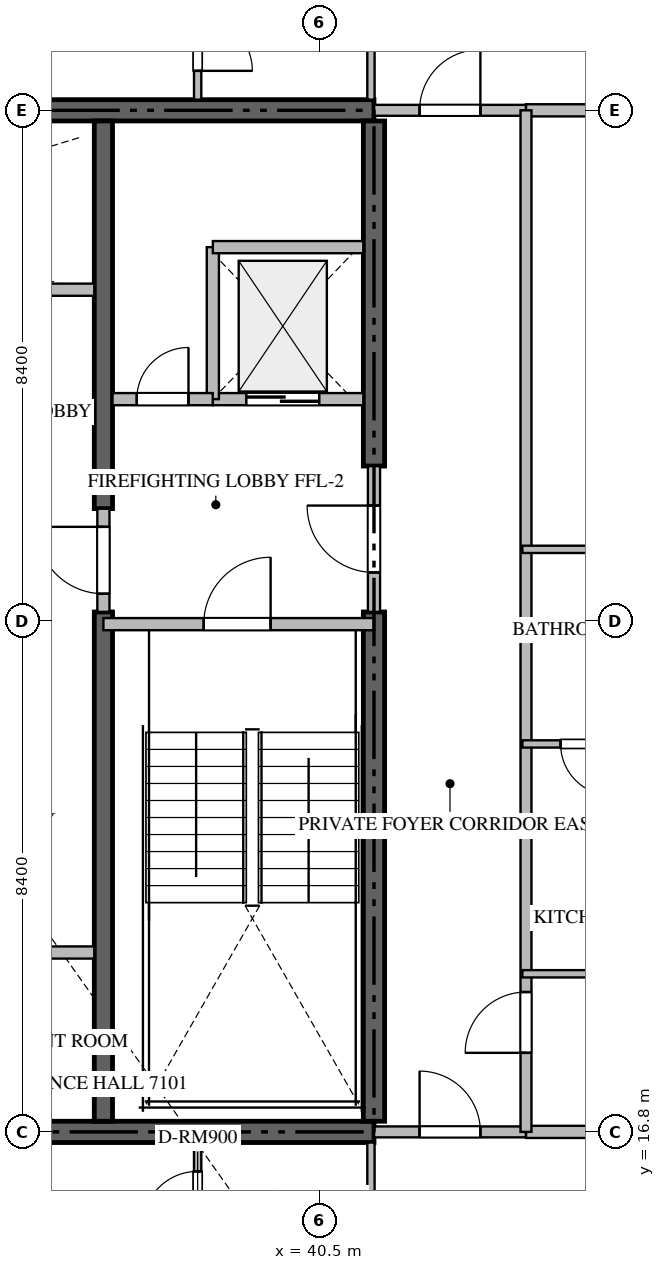
"""IFC4 building model, lengths in metres.
Left out: names, types, materials, properties, quantities, classifications, styles, units other than length and angle.
Written with IfcOpenShell. Run it as: python <this file> out.ifc"""

import sys

from ifc_helpers import new_model, si_unit, direction, frame, frame_2d, origin, place, context, subcontext, project, spatial, rectangle, extrude, source, transform, mapped, element, fill, save


model = new_model("IFC4")
c1 = context("Model", 3, precision=1e-05, world=origin(), true_north=direction((0.0, 1.0)))
c2 = subcontext(c1, "Body", "Model", "MODEL_VIEW")
j1 = project(units=[si_unit("LENGTHUNIT", "METRE"), si_unit("PLANEANGLEUNIT", "RADIAN")], contexts=[c1])
p1 = place(None, origin())
s1 = spatial("IfcSite", under=j1, at=p1, CompositionType="ELEMENT")
p2 = place(p1, origin())
s2 = spatial("IfcBuilding", under=s1, at=p2, CompositionType="ELEMENT")
p3 = place(p2, frame((0.0, 0.0, 283.6)))
s3 = spatial("IfcBuildingStorey", under=s2, at=p3, CompositionType="ELEMENT", Elevation=283.6)
for number, where, z_axis, x_axis in (
    (1, (23.4, 16.8, -0.26), (0.0, 0.0, 1.0), (1.0, 0.0, 0.0)),
    (2, (41.4, 33.6, -0.26), (0.0, 0.0, 1.0), (-1.0, 0.0, 0.0)),
):
    element("IfcWall", number, at=place(p3, frame(where, z_axis=z_axis, x_axis=x_axis)), inside=s3, PredefinedType="SHEAR", context=c2, shape_type="SweptSolid", body=[
        extrude(rectangle(XDim=18.0, YDim=0.35, at=frame_2d((9.0, 0.0))), origin(), (0.0, 0.0, 1.0), 3.668),
    ])
p4 = place(p3, frame((41.4, 16.975, -0.26), z_axis=(0.0, 0.0, 1.0), x_axis=(0.0, 1.0, 0.0)))
e3 = element("IfcWall", 3, at=p4, inside=s3, PredefinedType="SHEAR", context=c2, shape_type="SweptSolid", body=[
    extrude(rectangle(XDim=8.375, YDim=0.35, at=frame_2d((4.188, 0.0))), origin(), (0.0, 0.0, 1.0), 3.668),
])
p5 = place(p3, frame((41.4, 27.75, -0.26), z_axis=(0.0, 0.0, 1.0), x_axis=(0.0, 1.0, 0.0)))
e4 = element("IfcWall", 4, at=p5, inside=s3, PredefinedType="SHEAR", context=c2, shape_type="SweptSolid", body=[
    extrude(rectangle(XDim=5.675, YDim=0.35, at=frame_2d((2.837, 0.0))), origin(), (0.0, 0.0, 1.0), 3.668),
])
p6 = place(p3, frame((36.95, 16.975, -0.26), z_axis=(0.0, 0.0, 1.0), x_axis=(0.0, 1.0, 0.0)))
e5 = element("IfcWall", 5, at=p6, inside=s3, PredefinedType="SHEAR", context=c2, shape_type="SweptSolid", body=[
    extrude(rectangle(XDim=8.375, YDim=0.3, at=frame_2d((4.188, 0.0))), origin(), (0.0, 0.0, 1.0), 3.668),
])
p7 = place(p3, frame((36.95, 27.05, -0.26), z_axis=(0.0, 0.0, 1.0), x_axis=(0.0, 1.0, 0.0)))
e6 = element("IfcWall", 6, at=p7, inside=s3, PredefinedType="SHEAR", context=c2, shape_type="SweptSolid", body=[
    extrude(rectangle(XDim=6.375, YDim=0.3, at=frame_2d((3.188, 0.0))), origin(), (0.0, 0.0, 1.0), 3.668),
])
p8 = place(p3, frame((36.95, 25.15, 0.0), z_axis=(0.0, 0.0, 1.0), x_axis=(1.0, 0.0, 0.0)))
e7 = element("IfcWall", 7, at=p8, inside=s3, PredefinedType="STANDARD", context=c2, shape_type="SweptSolid", body=[
    extrude(rectangle(XDim=4.45, YDim=0.2, at=frame_2d((2.225, 0.0))), origin(), (0.0, 0.0, 1.0), 3.41),
])
p9 = place(p8, frame((1.65, 0.0, 0.0)))
e8 = element("IfcOpeningElement", 8, at=p9, cuts=e7, PredefinedType="OPENING", context=c2, shape_type="SweptSolid", body=[
    extrude(rectangle(XDim=1.1, YDim=2.15, at=frame_2d((0.55, 1.075))), frame((0.0, 0.11, 0.0), z_axis=(0.0, -1.0, 0.0), x_axis=(1.0, 0.0, 0.0)), (0.0, 0.0, 1.0), 0.22),
])
p10 = place(p3, frame((38.75, 28.85, 0.0), z_axis=(0.0, 0.0, 1.0), x_axis=(1.0, 0.0, 0.0)))
e9 = element("IfcWall", 9, at=p10, inside=s3, PredefinedType="STANDARD", context=c2, shape_type="SweptSolid", body=[
    extrude(rectangle(XDim=2.475, YDim=0.2, at=frame_2d((1.238, 0.0))), origin(), (0.0, 0.0, 1.0), 3.41),
])
p11 = place(p10, frame((0.55, 0.0, 0.0)))
e10 = element("IfcOpeningElement", 10, at=p11, cuts=e9, PredefinedType="OPENING", context=c2, shape_type="SweptSolid", body=[
    extrude(rectangle(XDim=1.2, YDim=2.2, at=frame_2d((0.6, 1.1))), frame((0.0, 0.11, 0.0), z_axis=(0.0, -1.0, 0.0), x_axis=(1.0, 0.0, 0.0)), (0.0, 0.0, 1.0), 0.22),
])
p12 = place(p3, frame((35.0, 30.65, 0.0), z_axis=(0.0, 0.0, 1.0), x_axis=(1.0, 0.0, 0.0)))
e11 = element("IfcWall", 11, at=p12, inside=s3, PredefinedType="STANDARD", context=c2, shape_type="SweptSolid", body=[
    extrude(rectangle(XDim=1.8, YDim=0.2, at=frame_2d((0.9, 0.0))), origin(), (0.0, 0.0, 1.0), 3.41),
])
p13 = place(p3, frame((38.75, 28.85, 0.0), z_axis=(0.0, 0.0, 1.0), x_axis=(0.0, 1.0, 0.0)))
e12 = element("IfcWall", 12, at=p13, inside=s3, PredefinedType="STANDARD", context=c2, shape_type="SweptSolid", body=[
    extrude(rectangle(XDim=2.5, YDim=0.2, at=frame_2d((1.25, 0.0))), origin(), (0.0, 0.0, 1.0), 3.41),
])
p14 = place(p3, frame((38.75, 31.35, 0.0), z_axis=(0.0, 0.0, 1.0), x_axis=(1.0, 0.0, 0.0)))
e13 = element("IfcWall", 13, at=p14, inside=s3, PredefinedType="STANDARD", context=c2, shape_type="SweptSolid", body=[
    extrude(rectangle(XDim=2.475, YDim=0.2, at=frame_2d((1.238, 0.0))), origin(), (0.0, 0.0, 1.0), 3.41),
])
p15 = place(p3, frame((37.1, 28.85, 0.0), z_axis=(0.0, 0.0, 1.0), x_axis=(1.0, 0.0, 0.0)))
e14 = element("IfcWall", 14, at=p15, inside=s3, PredefinedType="STANDARD", context=c2, shape_type="SweptSolid", body=[
    extrude(rectangle(XDim=1.648, YDim=0.2, at=frame_2d((0.824, 0.0))), origin(), (0.0, 0.0, 1.0), 3.41),
])
p16 = place(p15, frame((0.399, 0.0, 0.0)))
e15 = element("IfcOpeningElement", 15, at=p16, cuts=e14, PredefinedType="OPENING", context=c2, shape_type="SweptSolid", body=[
    extrude(rectangle(XDim=0.85, YDim=2.1, at=frame_2d((0.425, 1.05))), frame((0.0, 0.11, 0.0), z_axis=(0.0, -1.0, 0.0), x_axis=(1.0, 0.0, 0.0)), (0.0, 0.0, 1.0), 0.22),
])
p17 = place(p3, frame((41.4, 25.352, 0.0), z_axis=(0.0, 0.0, 1.0), x_axis=(0.0, 1.0, 0.0)))
e16 = element("IfcWall", 16, at=p17, inside=s3, PredefinedType="STANDARD", context=c2, shape_type="SweptSolid", body=[
    extrude(rectangle(XDim=2.396, YDim=0.2, at=frame_2d((1.198, 0.0))), origin(), (0.0, 0.0, 1.0), 3.41),
])
p18 = place(p17, frame((0.648, 0.0, 0.0)))
e17 = element("IfcOpeningElement", 17, at=p18, cuts=e16, PredefinedType="OPENING", context=c2, shape_type="SweptSolid", body=[
    extrude(rectangle(XDim=1.1, YDim=2.15, at=frame_2d((0.55, 1.075))), frame((0.0, 0.11, 0.0), z_axis=(0.0, -1.0, 0.0), x_axis=(1.0, 0.0, 0.0)), (0.0, 0.0, 1.0), 0.22),
])
p19 = place(p3, frame((36.95, 25.352, 0.0), z_axis=(0.0, 0.0, 1.0), x_axis=(0.0, 1.0, 0.0)))
e18 = element("IfcWall", 18, at=p19, inside=s3, PredefinedType="STANDARD", context=c2, shape_type="SweptSolid", body=[
    extrude(rectangle(XDim=1.696, YDim=0.2, at=frame_2d((0.848, 0.0))), origin(), (0.0, 0.0, 1.0), 3.41),
])
p20 = place(p19, frame((0.298, 0.0, 0.0)))
e19 = element("IfcOpeningElement", 19, at=p20, cuts=e18, PredefinedType="OPENING", context=c2, shape_type="SweptSolid", body=[
    extrude(rectangle(XDim=1.1, YDim=2.15, at=frame_2d((0.55, 1.075))), frame((0.0, 0.11, 0.0), z_axis=(0.0, -1.0, 0.0), x_axis=(1.0, 0.0, 0.0)), (0.0, 0.0, 1.0), 0.22),
])
p21 = place(p3, frame((28.0, 19.75, 0.0), z_axis=(0.0, 0.0, 1.0), x_axis=(1.0, 0.0, 0.0)))
e20 = element("IfcWall", 20, at=p21, inside=s3, PredefinedType="STANDARD", context=c2, shape_type="SweptSolid", body=[
    extrude(rectangle(XDim=8.8, YDim=0.2, at=frame_2d((4.4, 0.0))), origin(), (0.0, 0.0, 1.0), 3.41),
])
p22 = place(p21, frame((3.95, 0.0, 0.0)))
e21 = element("IfcOpeningElement", 21, at=p22, cuts=e20, PredefinedType="OPENING", context=c2, shape_type="SweptSolid", body=[
    extrude(rectangle(XDim=0.9, YDim=2.1, at=frame_2d((0.45, 1.05))), frame((0.0, 0.11, 0.0), z_axis=(0.0, -1.0, 0.0), x_axis=(1.0, 0.0, 0.0)), (0.0, 0.0, 1.0), 0.22),
])
for number, where, z_axis, x_axis in (
    (22, (43.9, 16.8, 0.0), (0.0, 0.0, 1.0), (1.0, 0.0, 0.0)),
    (23, (43.9, 33.6, 0.0), (0.0, 0.0, 1.0), (1.0, 0.0, 0.0)),
):
    element("IfcWall", number, at=place(p3, frame(where, z_axis=z_axis, x_axis=x_axis)), inside=s3, PredefinedType="PARTITIONING", context=c2, shape_type="SweptSolid", body=[
        extrude(rectangle(XDim=13.418, YDim=0.2, at=frame_2d((6.709, 0.0))), origin(), (0.0, 0.0, 1.0), 3.41),
    ])
p23 = place(p3, frame((41.402, 16.8, 0.0), z_axis=(0.0, 0.0, 1.0), x_axis=(1.0, 0.0, 0.0)))
e24 = element("IfcWall", 24, at=p23, inside=s3, PredefinedType="PARTITIONING", context=c2, shape_type="SweptSolid", body=[
    extrude(rectangle(XDim=2.496, YDim=0.18, at=frame_2d((1.248, 0.0))), origin(), (0.0, 0.0, 1.0), 3.41),
])
p24 = place(p23, frame((0.748, 0.0, 0.0)))
e25 = element("IfcOpeningElement", 25, at=p24, cuts=e24, PredefinedType="OPENING", context=c2, shape_type="SweptSolid", body=[
    extrude(rectangle(XDim=1.0, YDim=2.15, at=frame_2d((0.5, 1.075))), frame((0.0, 0.1, 0.0), z_axis=(0.0, -1.0, 0.0), x_axis=(1.0, 0.0, 0.0)), (0.0, 0.0, 1.0), 0.2),
])
p25 = place(p3, frame((41.402, 33.6, 0.0), z_axis=(0.0, 0.0, 1.0), x_axis=(1.0, 0.0, 0.0)))
e26 = element("IfcWall", 26, at=p25, inside=s3, PredefinedType="PARTITIONING", context=c2, shape_type="SweptSolid", body=[
    extrude(rectangle(XDim=2.496, YDim=0.18, at=frame_2d((1.248, 0.0))), origin(), (0.0, 0.0, 1.0), 3.41),
])
p26 = place(p25, frame((0.748, 0.0, 0.0)))
e27 = element("IfcOpeningElement", 27, at=p26, cuts=e26, PredefinedType="OPENING", context=c2, shape_type="SweptSolid", body=[
    extrude(rectangle(XDim=1.0, YDim=2.15, at=frame_2d((0.5, 1.075))), frame((0.0, 0.1, 0.0), z_axis=(0.0, -1.0, 0.0), x_axis=(1.0, 0.0, 0.0)), (0.0, 0.0, 1.0), 0.2),
])
p27 = place(p3, frame((43.9, 16.8, 0.0), z_axis=(0.0, 0.0, 1.0), x_axis=(0.0, 1.0, 0.0)))
e28 = element("IfcWall", 28, at=p27, inside=s3, PredefinedType="PARTITIONING", context=c2, shape_type="SweptSolid", body=[
    extrude(rectangle(XDim=16.8, YDim=0.18, at=frame_2d((8.4, 0.0))), origin(), (0.0, 0.0, 1.0), 3.41),
])
p28 = place(p27, frame((1.3, 0.0, 0.0)))
e29 = element("IfcOpeningElement", 29, at=p28, cuts=e28, PredefinedType="OPENING", context=c2, shape_type="SweptSolid", body=[
    extrude(rectangle(XDim=1.0, YDim=2.15, at=frame_2d((0.5, 1.075))), frame((0.0, 0.1, 0.0), z_axis=(0.0, -1.0, 0.0), x_axis=(1.0, 0.0, 0.0)), (0.0, 0.0, 1.0), 0.2),
])
p29 = place(p3, frame((41.35, 14.05, 0.0), z_axis=(0.0, 0.0, 1.0), x_axis=(0.0, 1.0, 0.0)))
e30 = element("IfcWall", 30, at=p29, inside=s3, PredefinedType="PARTITIONING", context=c2, shape_type="SweptSolid", body=[
    extrude(rectangle(XDim=2.575, YDim=0.12, at=frame_2d((1.288, 0.0))), origin(), (0.0, 0.0, 1.0), 3.41),
])
p30 = place(p3, frame((38.5, 14.65, 0.0), z_axis=(0.0, 0.0, 1.0), x_axis=(0.0, 1.0, 0.0)))
e31 = element("IfcWall", 31, at=p30, inside=s3, PredefinedType="PARTITIONING", context=c2, shape_type="SweptSolid", body=[
    extrude(rectangle(XDim=1.975, YDim=0.12, at=frame_2d((0.988, 0.0))), origin(), (0.0, 0.0, 1.0), 3.41),
])
p31 = place(p30, frame((0.601, 0.0, 0.0)))
e32 = element("IfcOpeningElement", 32, at=p31, cuts=e31, PredefinedType="OPENING", context=c2, shape_type="SweptSolid", body=[
    extrude(rectangle(XDim=0.9, YDim=2.1, at=frame_2d((0.45, 1.05))), frame((0.0, 0.07, 0.0), z_axis=(0.0, -1.0, 0.0), x_axis=(1.0, 0.0, 0.0)), (0.0, 0.0, 1.0), 0.14),
])
p32 = place(p3, frame((41.35, 36.35, 0.0), z_axis=(0.0, 0.0, 1.0), x_axis=(0.0, -1.0, 0.0)))
e33 = element("IfcWall", 33, at=p32, inside=s3, PredefinedType="PARTITIONING", context=c2, shape_type="SweptSolid", body=[
    extrude(rectangle(XDim=2.575, YDim=0.12, at=frame_2d((1.288, 0.0))), origin(), (0.0, 0.0, 1.0), 3.41),
])
p33 = place(p3, frame((38.5, 35.75, 0.0), z_axis=(0.0, 0.0, 1.0), x_axis=(0.0, -1.0, 0.0)))
e34 = element("IfcWall", 34, at=p33, inside=s3, PredefinedType="PARTITIONING", context=c2, shape_type="SweptSolid", body=[
    extrude(rectangle(XDim=1.975, YDim=0.12, at=frame_2d((0.988, 0.0))), origin(), (0.0, 0.0, 1.0), 3.41),
])
p34 = place(p33, frame((0.601, 0.0, 0.0)))
e35 = element("IfcOpeningElement", 35, at=p34, cuts=e34, PredefinedType="OPENING", context=c2, shape_type="SweptSolid", body=[
    extrude(rectangle(XDim=0.9, YDim=2.1, at=frame_2d((0.45, 1.05))), frame((0.0, 0.07, 0.0), z_axis=(0.0, -1.0, 0.0), x_axis=(1.0, 0.0, 0.0)), (0.0, 0.0, 1.0), 0.14),
])
p35 = place(p3, frame((46.65, 19.4, 0.0), z_axis=(0.0, 0.0, 1.0), x_axis=(-1.0, 0.0, 0.0)))
e36 = element("IfcWall", 36, at=p35, inside=s3, PredefinedType="PARTITIONING", context=c2, shape_type="SweptSolid", body=[
    extrude(rectangle(XDim=2.81, YDim=0.12, at=frame_2d((1.405, 0.0))), origin(), (0.0, 0.0, 1.0), 3.41),
])
p36 = place(p3, frame((45.95, 26.38, 0.0), z_axis=(0.0, 0.0, 1.0), x_axis=(-1.0, 0.0, 0.0)))
e37 = element("IfcWall", 37, at=p36, inside=s3, PredefinedType="PARTITIONING", context=c2, shape_type="SweptSolid", body=[
    extrude(rectangle(XDim=2.11, YDim=0.12, at=frame_2d((1.055, 0.0))), origin(), (0.0, 0.0, 1.0), 3.41),
])
p37 = place(p3, frame((45.948, 23.18, 0.0), z_axis=(0.0, 0.0, 1.0), x_axis=(-1.0, 0.0, 0.0)))
e38 = element("IfcWall", 38, at=p37, inside=s3, PredefinedType="PARTITIONING", context=c2, shape_type="SweptSolid", body=[
    extrude(rectangle(XDim=2.108, YDim=0.12, at=frame_2d((1.054, 0.0))), origin(), (0.0, 0.0, 1.0), 3.41),
])
p38 = place(p37, frame((0.629, 0.0, 0.0)))
e39 = element("IfcOpeningElement", 39, at=p38, cuts=e38, PredefinedType="OPENING", context=c2, shape_type="SweptSolid", body=[
    extrude(rectangle(XDim=0.85, YDim=2.1, at=frame_2d((0.425, 1.05))), frame((0.0, 0.07, 0.0), z_axis=(0.0, -1.0, 0.0), x_axis=(1.0, 0.0, 0.0)), (0.0, 0.0, 1.0), 0.14),
])
m1 = source(origin(), c2, "Body", "SweptSolid", [
    extrude(rectangle(XDim=1.1, YDim=2.15, at=frame_2d((0.55, 1.075))), frame((0.0, 0.025, 0.0), z_axis=(0.0, -1.0, 0.0), x_axis=(1.0, 0.0, 0.0)), (0.0, 0.0, 1.0), 0.05),
])
p39 = place(p9, origin())
e40 = element("IfcDoor", 40, at=p39, inside=s3, OperationType="SINGLE_SWING_RIGHT", PredefinedType="DOOR", context=c2, shape_type="MappedRepresentation", body=[
    mapped(m1, transform((0.0, 0.0, 0.0), scale=1.0)),
])
fill(e8, e40)
m2 = source(origin(), c2, "Body", "SweptSolid", [
    extrude(rectangle(XDim=1.2, YDim=2.2, at=frame_2d((0.6, 1.1))), frame((0.0, 0.025, 0.0), z_axis=(0.0, -1.0, 0.0), x_axis=(1.0, 0.0, 0.0)), (0.0, 0.0, 1.0), 0.05),
])
p40 = place(p11, origin())
e41 = element("IfcDoor", 41, at=p40, inside=s3, OperationType="DOUBLE_DOOR_SLIDING", PredefinedType="DOOR", context=c2, shape_type="MappedRepresentation", body=[
    mapped(m2, transform((0.0, 0.0, 0.0), scale=1.0)),
])
fill(e10, e41)
m3 = source(origin(), c2, "Body", "SweptSolid", [
    extrude(rectangle(XDim=0.85, YDim=2.1, at=frame_2d((0.425, 1.05))), frame((0.0, 0.025, 0.0), z_axis=(0.0, -1.0, 0.0), x_axis=(1.0, 0.0, 0.0)), (0.0, 0.0, 1.0), 0.05),
])
p41 = place(p16, origin())
e42 = element("IfcDoor", 42, at=p41, inside=s3, OperationType="SINGLE_SWING_RIGHT", PredefinedType="DOOR", context=c2, shape_type="MappedRepresentation", body=[
    mapped(m3, transform((0.0, 0.0, 0.0), scale=1.0)),
])
fill(e15, e42)
p42 = place(p18, origin())
e43 = element("IfcDoor", 43, at=p42, inside=s3, OperationType="SINGLE_SWING_RIGHT", PredefinedType="DOOR", context=c2, shape_type="MappedRepresentation", body=[
    mapped(m1, transform((0.0, 0.0, 0.0), scale=1.0)),
])
fill(e17, e43)
p43 = place(p20, origin())
e44 = element("IfcDoor", 44, at=p43, inside=s3, OperationType="SINGLE_SWING_RIGHT", PredefinedType="DOOR", context=c2, shape_type="MappedRepresentation", body=[
    mapped(m1, transform((0.0, 0.0, 0.0), scale=1.0)),
])
fill(e19, e44)
m4 = source(origin(), c2, "Body", "SweptSolid", [
    extrude(rectangle(XDim=1.0, YDim=2.15, at=frame_2d((0.5, 1.075))), frame((0.0, 0.025, 0.0), z_axis=(0.0, -1.0, 0.0), x_axis=(1.0, 0.0, 0.0)), (0.0, 0.0, 1.0), 0.05),
])
p44 = place(p24, origin())
e45 = element("IfcDoor", 45, at=p44, inside=s3, OperationType="SINGLE_SWING_LEFT", PredefinedType="DOOR", context=c2, shape_type="MappedRepresentation", body=[
    mapped(m4, transform((0.0, 0.0, 0.0), scale=1.0)),
])
fill(e25, e45)
p45 = place(p26, origin())
e46 = element("IfcDoor", 46, at=p45, inside=s3, OperationType="SINGLE_SWING_RIGHT", PredefinedType="DOOR", context=c2, shape_type="MappedRepresentation", body=[
    mapped(m4, transform((0.0, 0.0, 0.0), scale=1.0)),
])
fill(e27, e46)
p46 = place(p28, origin())
e47 = element("IfcDoor", 47, at=p46, inside=s3, OperationType="SINGLE_SWING_LEFT", PredefinedType="DOOR", context=c2, shape_type="MappedRepresentation", body=[
    mapped(m4, transform((0.0, 0.0, 0.0), scale=1.0)),
])
fill(e29, e47)
m5 = source(origin(), c2, "Body", "SweptSolid", [
    extrude(rectangle(XDim=0.9, YDim=2.1, at=frame_2d((0.45, 1.05))), frame((0.0, 0.025, 0.0), z_axis=(0.0, -1.0, 0.0), x_axis=(1.0, 0.0, 0.0)), (0.0, 0.0, 1.0), 0.05),
])
p47 = place(p31, origin())
e48 = element("IfcDoor", 48, at=p47, inside=s3, OperationType="SINGLE_SWING_LEFT", PredefinedType="DOOR", context=c2, shape_type="MappedRepresentation", body=[
    mapped(m5, transform((0.0, 0.0, 0.0), scale=1.0)),
])
fill(e32, e48)
p48 = place(p34, origin())
e49 = element("IfcDoor", 49, at=p48, inside=s3, OperationType="SINGLE_SWING_RIGHT", PredefinedType="DOOR", context=c2, shape_type="MappedRepresentation", body=[
    mapped(m5, transform((0.0, 0.0, 0.0), scale=1.0)),
])
fill(e35, e49)
p49 = place(p38, origin())
e50 = element("IfcDoor", 50, at=p49, inside=s3, OperationType="SINGLE_SWING_LEFT", PredefinedType="DOOR", context=c2, shape_type="MappedRepresentation", body=[
    mapped(m3, transform((0.0, 0.0, 0.0), scale=1.0)),
])
fill(e39, e50)
save(model, sys.argv[1])
